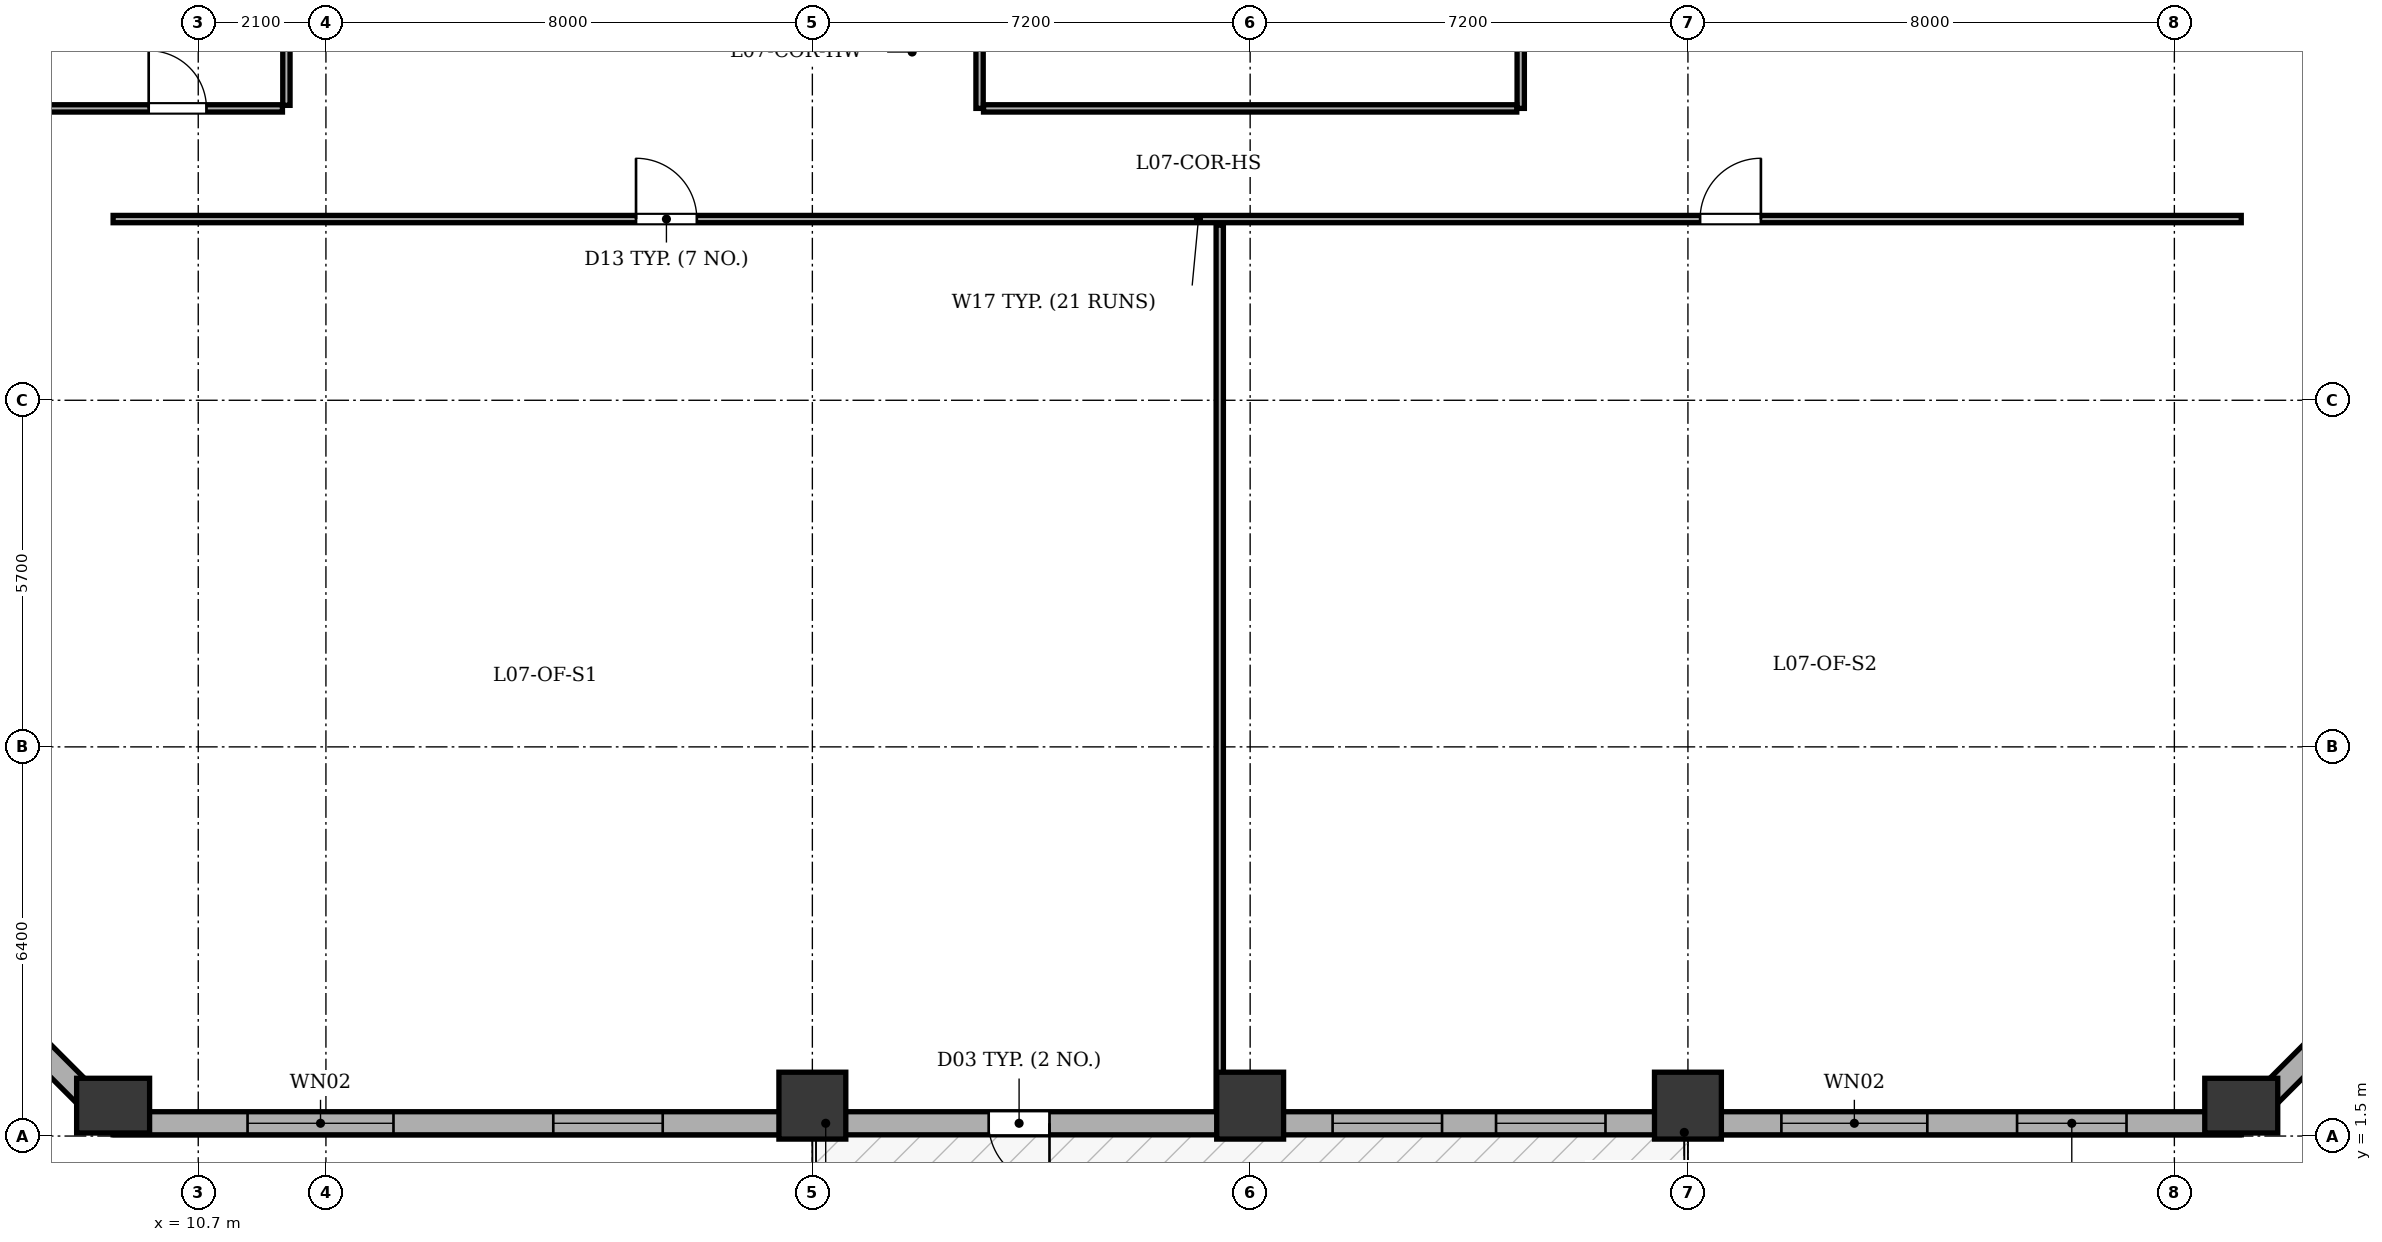
"""IFC4 building model, lengths in metres.
Left out: names, types, materials, properties, quantities, classifications, styles, units other than length and angle.
Written with IfcOpenShell. Run it as: python <this file> out.ifc"""

import sys

from ifc_helpers import new_model, si_unit, direction, frame, frame_2d, origin, origin_2d, place, context, subcontext, project, spatial, rectangle, extrude, element, fill, save


model = new_model("IFC4")
c1 = context("Model", 3, precision=1e-05, world=origin(), true_north=direction((0.0, 1.0)))
c2 = subcontext(c1, "Body", "Model", "MODEL_VIEW")
j1 = project(units=[si_unit("LENGTHUNIT", "METRE"), si_unit("PLANEANGLEUNIT", "RADIAN")], contexts=[c1])
p1 = place(None, origin())
s1 = spatial("IfcSite", under=j1, at=p1, CompositionType="ELEMENT")
p2 = place(p1, origin())
s2 = spatial("IfcBuilding", under=s1, at=p2, CompositionType="ELEMENT")
p3 = place(p2, frame((0.0, 0.0, 32.1)))
s3 = spatial("IfcBuildingStorey", under=s2, at=p3, CompositionType="ELEMENT", Elevation=32.1)
p4 = place(p3, frame((9.3, 2.0, 0.0), z_axis=(0.0, 0.0, 1.0), x_axis=(1.0, 0.0, 0.0)))
e1 = element("IfcColumn", 1, at=p4, inside=s3, PredefinedType="COLUMN", context=c2, shape_type="SweptSolid", body=[
    extrude(rectangle(XDim=0.9, YDim=1.2, at=origin_2d()), origin(), (0.0, 0.0, 1.0), 3.9),
])
for number, where, z_axis, x_axis in (
    (2, (20.8, 2.0, 0.0), (0.0, 0.0, 1.0), (1.0, 0.0, 0.0)),
    (3, (28.0, 2.0, 0.0), (0.0, 0.0, 1.0), (1.0, 0.0, 0.0)),
    (4, (35.2, 2.0, 0.0), (0.0, 0.0, 1.0), (1.0, 0.0, 0.0)),
):
    element("IfcColumn", number, at=place(p3, frame(where, z_axis=z_axis, x_axis=x_axis)), inside=s3, PredefinedType="COLUMN", context=c2, shape_type="SweptSolid", body=[
        extrude(rectangle(XDim=1.1, YDim=1.1, at=origin_2d()), origin(), (0.0, 0.0, 1.0), 3.9),
    ])
p5 = place(p3, frame((44.3, 2.0, 0.0), z_axis=(0.0, 0.0, 1.0), x_axis=(1.0, 0.0, 0.0)))
e5 = element("IfcColumn", 5, at=p5, inside=s3, PredefinedType="COLUMN", context=c2, shape_type="SweptSolid", body=[
    extrude(rectangle(XDim=0.9, YDim=1.2, at=origin_2d()), origin(), (0.0, 0.0, 1.0), 3.9),
])
p6 = place(p3, frame((44.3, 1.71, 0.0), z_axis=(0.0, 0.0, 1.0), x_axis=(-1.0, 0.0, 0.0)))
e6 = element("IfcWall", 6, at=p6, inside=s3, PredefinedType="STANDARD", context=c2, shape_type="SweptSolid", body=[
    extrude(rectangle(XDim=35.0, YDim=0.38, at=frame_2d((17.5, 0.0))), origin(), (0.0, 0.0, 1.0), 3.135),
])
p7 = place(p6, frame((19.6, 0.0, 0.0)))
e7 = element("IfcOpeningElement", 7, at=p7, cuts=e6, PredefinedType="OPENING", context=c2, shape_type="SweptSolid", body=[
    extrude(rectangle(XDim=1.0, YDim=2.02, at=frame_2d((0.5, 1.01))), frame((0.0, 0.2, 0.0), z_axis=(0.0, -1.0, 0.0), x_axis=(1.0, 0.0, 0.0)), (0.0, 0.0, 1.0), 0.4),
])
p8 = place(p6, frame((1.887, 0.0, 0.8)))
e8 = element("IfcOpeningElement", 8, at=p8, cuts=e6, PredefinedType="OPENING", context=c2, shape_type="SweptSolid", body=[
    extrude(rectangle(XDim=1.8, YDim=1.9, at=frame_2d((0.9, 0.95))), frame((0.0, 0.2, 0.0), z_axis=(0.0, -1.0, 0.0), x_axis=(1.0, 0.0, 0.0)), (0.0, 0.0, 1.0), 0.4),
])
p9 = place(p6, frame((5.163, 0.0, 0.8)))
e9 = element("IfcOpeningElement", 9, at=p9, cuts=e6, PredefinedType="OPENING", context=c2, shape_type="SweptSolid", body=[
    extrude(rectangle(XDim=2.4, YDim=1.9, at=frame_2d((1.2, 0.95))), frame((0.0, 0.2, 0.0), z_axis=(0.0, -1.0, 0.0), x_axis=(1.0, 0.0, 0.0)), (0.0, 0.0, 1.0), 0.4),
])
p10 = place(p6, frame((10.456, 0.0, 0.8)))
e10 = element("IfcOpeningElement", 10, at=p10, cuts=e6, PredefinedType="OPENING", context=c2, shape_type="SweptSolid", body=[
    extrude(rectangle(XDim=1.8, YDim=1.9, at=frame_2d((0.9, 0.95))), frame((0.0, 0.2, 0.0), z_axis=(0.0, -1.0, 0.0), x_axis=(1.0, 0.0, 0.0)), (0.0, 0.0, 1.0), 0.4),
])
p11 = place(p6, frame((13.144, 0.0, 0.8)))
e11 = element("IfcOpeningElement", 11, at=p11, cuts=e6, PredefinedType="OPENING", context=c2, shape_type="SweptSolid", body=[
    extrude(rectangle(XDim=1.8, YDim=1.9, at=frame_2d((0.9, 0.95))), frame((0.0, 0.2, 0.0), z_axis=(0.0, -1.0, 0.0), x_axis=(1.0, 0.0, 0.0)), (0.0, 0.0, 1.0), 0.4),
])
p12 = place(p6, frame((25.961, 0.0, 0.8)))
e12 = element("IfcOpeningElement", 12, at=p12, cuts=e6, PredefinedType="OPENING", context=c2, shape_type="SweptSolid", body=[
    extrude(rectangle(XDim=1.8, YDim=1.9, at=frame_2d((0.9, 0.95))), frame((0.0, 0.2, 0.0), z_axis=(0.0, -1.0, 0.0), x_axis=(1.0, 0.0, 0.0)), (0.0, 0.0, 1.0), 0.4),
])
p13 = place(p6, frame((30.389, 0.0, 0.8)))
e13 = element("IfcOpeningElement", 13, at=p13, cuts=e6, PredefinedType="OPENING", context=c2, shape_type="SweptSolid", body=[
    extrude(rectangle(XDim=2.4, YDim=1.9, at=frame_2d((1.2, 0.95))), frame((0.0, 0.2, 0.0), z_axis=(0.0, -1.0, 0.0), x_axis=(1.0, 0.0, 0.0)), (0.0, 0.0, 1.0), 0.4),
])
p14 = place(p3, frame((9.3, 1.71, 0.0), z_axis=(0.0, 0.0, 1.0), x_axis=(-0.707106781187, 0.707106781187, 0.0)))
e14 = element("IfcWall", 14, at=p14, inside=s3, PredefinedType="STANDARD", context=c2, shape_type="SweptSolid", body=[
    extrude(rectangle(XDim=6.774, YDim=0.38, at=frame_2d((3.387, 0.0))), origin(), (0.0, 0.0, 1.0), 3.135),
])
p15 = place(p14, frame((2.687, 0.0, 0.8)))
e15 = element("IfcOpeningElement", 15, at=p15, cuts=e14, PredefinedType="OPENING", context=c2, shape_type="SweptSolid", body=[
    extrude(rectangle(XDim=1.4, YDim=1.65, at=frame_2d((0.7, 0.825))), frame((0.0, 0.2, 0.0), z_axis=(0.0, -1.0, 0.0), x_axis=(1.0, 0.0, 0.0)), (0.0, 0.0, 1.0), 0.4),
])
p16 = place(p3, frame((49.09, 6.5, 0.0), z_axis=(0.0, 0.0, 1.0), x_axis=(-0.707106781187, -0.707106781187, 0.0)))
e16 = element("IfcWall", 16, at=p16, inside=s3, PredefinedType="STANDARD", context=c2, shape_type="SweptSolid", body=[
    extrude(rectangle(XDim=6.774, YDim=0.38, at=frame_2d((3.387, 0.0))), origin(), (0.0, 0.0, 1.0), 3.135),
])
p17 = place(p16, frame((2.687, 0.0, 0.8)))
e17 = element("IfcOpeningElement", 17, at=p17, cuts=e16, PredefinedType="OPENING", context=c2, shape_type="SweptSolid", body=[
    extrude(rectangle(XDim=1.4, YDim=1.65, at=frame_2d((0.7, 0.825))), frame((0.0, 0.2, 0.0), z_axis=(0.0, -1.0, 0.0), x_axis=(1.0, 0.0, 0.0)), (0.0, 0.0, 1.0), 0.4),
])
for number, where, z_axis, x_axis in (
    (18, (23.55, 18.4, 0.0), (0.0, 0.0, 1.0), (0.0, 1.0, 0.0)),
    (19, (32.45, 18.4, 0.0), (0.0, 0.0, 1.0), (0.0, 1.0, 0.0)),
):
    element("IfcWall", number, at=place(p3, frame(where, z_axis=z_axis, x_axis=x_axis)), inside=s3, PredefinedType="PARTITIONING", context=c2, shape_type="SweptSolid", body=[
        extrude(rectangle(XDim=3.485, YDim=0.12, at=frame_2d((1.743, 0.0))), origin(), (0.0, 0.0, 1.0), 3.6),
    ])
p18 = place(p3, frame((23.615, 18.4, 0.0), z_axis=(0.0, 0.0, 1.0), x_axis=(1.0, 0.0, 0.0)))
e20 = element("IfcWall", 20, at=p18, inside=s3, PredefinedType="PARTITIONING", context=c2, shape_type="SweptSolid", body=[
    extrude(rectangle(XDim=8.77, YDim=0.12, at=frame_2d((4.385, 0.0))), origin(), (0.0, 0.0, 1.0), 3.6),
])
p19 = place(p3, frame((9.3, 16.58, 0.0), z_axis=(0.0, 0.0, 1.0), x_axis=(1.0, 0.0, 0.0)))
e21 = element("IfcWall", 21, at=p19, inside=s3, PredefinedType="PARTITIONING", context=c2, shape_type="SweptSolid", body=[
    extrude(rectangle(XDim=35.0, YDim=0.12, at=frame_2d((17.5, 0.0))), origin(), (0.0, 0.0, 1.0), 3.6),
])
p20 = place(p19, frame((8.6, 0.0, 0.0)))
e22 = element("IfcOpeningElement", 22, at=p20, cuts=e21, PredefinedType="OPENING", context=c2, shape_type="SweptSolid", body=[
    extrude(rectangle(XDim=1.0, YDim=2.1, at=frame_2d((0.5, 1.05))), frame((0.0, 0.07, 0.0), z_axis=(0.0, -1.0, 0.0), x_axis=(1.0, 0.0, 0.0)), (0.0, 0.0, 1.0), 0.14),
])
p21 = place(p19, frame((26.1, 0.0, 0.0)))
e23 = element("IfcOpeningElement", 23, at=p21, cuts=e21, PredefinedType="OPENING", context=c2, shape_type="SweptSolid", body=[
    extrude(rectangle(XDim=1.0, YDim=2.1, at=frame_2d((0.5, 1.05))), frame((0.0, 0.07, 0.0), z_axis=(0.0, -1.0, 0.0), x_axis=(1.0, 0.0, 0.0)), (0.0, 0.0, 1.0), 0.14),
])
p22 = place(p3, frame((27.5, 1.905, 0.0), z_axis=(0.0, 0.0, 1.0), x_axis=(0.0, 1.0, 0.0)))
e24 = element("IfcWall", 24, at=p22, inside=s3, PredefinedType="PARTITIONING", context=c2, shape_type="SweptSolid", body=[
    extrude(rectangle(XDim=14.575, YDim=0.12, at=frame_2d((7.288, 0.0))), origin(), (0.0, 0.0, 1.0), 3.6),
])
p23 = place(p3, frame((12.15, 18.45, 0.0), z_axis=(0.0, 0.0, 1.0), x_axis=(0.0, 1.0, 0.0)))
e25 = element("IfcWall", 25, at=p23, inside=s3, PredefinedType="PARTITIONING", context=c2, shape_type="SweptSolid", body=[
    extrude(rectangle(XDim=17.5, YDim=0.12, at=frame_2d((8.75, 0.0))), origin(), (0.0, 0.0, 1.0), 3.6),
])
p24 = place(p3, frame((4.705, 18.4, 0.0), z_axis=(0.0, 0.0, 1.0), x_axis=(1.0, 0.0, 0.0)))
e26 = element("IfcWall", 26, at=p24, inside=s3, PredefinedType="PARTITIONING", context=c2, shape_type="SweptSolid", body=[
    extrude(rectangle(XDim=7.38, YDim=0.12, at=frame_2d((3.69, 0.0))), origin(), (0.0, 0.0, 1.0), 3.6),
])
p25 = place(p24, frame((5.18, 0.0, 0.0)))
e27 = element("IfcOpeningElement", 27, at=p25, cuts=e26, PredefinedType="OPENING", context=c2, shape_type="SweptSolid", body=[
    extrude(rectangle(XDim=0.95, YDim=2.1, at=frame_2d((0.475, 1.05))), frame((0.0, 0.07, 0.0), z_axis=(0.0, -1.0, 0.0), x_axis=(1.0, 0.0, 0.0)), (0.0, 0.0, 1.0), 0.14),
])
p26 = place(p7, origin())
e28 = element("IfcDoor", 28, at=p26, inside=s3, OperationType="SINGLE_SWING_LEFT", PredefinedType="DOOR", context=c2, shape_type="SweptSolid", body=[
    extrude(rectangle(XDim=1.0, YDim=2.02, at=frame_2d((0.5, 1.01))), frame((0.0, 0.025, 0.0), z_axis=(0.0, -1.0, 0.0), x_axis=(1.0, 0.0, 0.0)), (0.0, 0.0, 1.0), 0.05),
])
fill(e7, e28)
p27 = place(p8, origin())
e29 = element("IfcWindow", 29, at=p27, inside=s3, PartitioningType="SINGLE_PANEL", PredefinedType="WINDOW", context=c2, shape_type="SweptSolid", body=[
    extrude(rectangle(XDim=1.8, YDim=1.9, at=frame_2d((0.9, 0.95))), frame((0.0, -0.01, 0.0), z_axis=(0.0, -1.0, 0.0), x_axis=(1.0, 0.0, 0.0)), (0.0, 0.0, 1.0), 0.06),
])
fill(e8, e29)
p28 = place(p9, origin())
e30 = element("IfcWindow", 30, at=p28, inside=s3, PartitioningType="SINGLE_PANEL", PredefinedType="WINDOW", context=c2, shape_type="SweptSolid", body=[
    extrude(rectangle(XDim=2.4, YDim=1.9, at=frame_2d((1.2, 0.95))), frame((0.0, -0.01, 0.0), z_axis=(0.0, -1.0, 0.0), x_axis=(1.0, 0.0, 0.0)), (0.0, 0.0, 1.0), 0.06),
])
fill(e9, e30)
p29 = place(p10, origin())
e31 = element("IfcWindow", 31, at=p29, inside=s3, PartitioningType="SINGLE_PANEL", PredefinedType="WINDOW", context=c2, shape_type="SweptSolid", body=[
    extrude(rectangle(XDim=1.8, YDim=1.9, at=frame_2d((0.9, 0.95))), frame((0.0, -0.01, 0.0), z_axis=(0.0, -1.0, 0.0), x_axis=(1.0, 0.0, 0.0)), (0.0, 0.0, 1.0), 0.06),
])
fill(e10, e31)
p30 = place(p11, origin())
e32 = element("IfcWindow", 32, at=p30, inside=s3, PartitioningType="SINGLE_PANEL", PredefinedType="WINDOW", context=c2, shape_type="SweptSolid", body=[
    extrude(rectangle(XDim=1.8, YDim=1.9, at=frame_2d((0.9, 0.95))), frame((0.0, -0.01, 0.0), z_axis=(0.0, -1.0, 0.0), x_axis=(1.0, 0.0, 0.0)), (0.0, 0.0, 1.0), 0.06),
])
fill(e11, e32)
p31 = place(p12, origin())
e33 = element("IfcWindow", 33, at=p31, inside=s3, PartitioningType="SINGLE_PANEL", PredefinedType="WINDOW", context=c2, shape_type="SweptSolid", body=[
    extrude(rectangle(XDim=1.8, YDim=1.9, at=frame_2d((0.9, 0.95))), frame((0.0, -0.01, 0.0), z_axis=(0.0, -1.0, 0.0), x_axis=(1.0, 0.0, 0.0)), (0.0, 0.0, 1.0), 0.06),
])
fill(e12, e33)
p32 = place(p13, origin())
e34 = element("IfcWindow", 34, at=p32, inside=s3, PartitioningType="SINGLE_PANEL", PredefinedType="WINDOW", context=c2, shape_type="SweptSolid", body=[
    extrude(rectangle(XDim=2.4, YDim=1.9, at=frame_2d((1.2, 0.95))), frame((0.0, -0.01, 0.0), z_axis=(0.0, -1.0, 0.0), x_axis=(1.0, 0.0, 0.0)), (0.0, 0.0, 1.0), 0.06),
])
fill(e13, e34)
p33 = place(p20, origin())
e35 = element("IfcDoor", 35, at=p33, inside=s3, OperationType="SINGLE_SWING_LEFT", PredefinedType="DOOR", context=c2, shape_type="SweptSolid", body=[
    extrude(rectangle(XDim=1.0, YDim=2.1, at=frame_2d((0.5, 1.05))), frame((0.0, 0.025, 0.0), z_axis=(0.0, -1.0, 0.0), x_axis=(1.0, 0.0, 0.0)), (0.0, 0.0, 1.0), 0.05),
])
fill(e22, e35)
p34 = place(p21, origin())
e36 = element("IfcDoor", 36, at=p34, inside=s3, OperationType="SINGLE_SWING_RIGHT", PredefinedType="DOOR", context=c2, shape_type="SweptSolid", body=[
    extrude(rectangle(XDim=1.0, YDim=2.1, at=frame_2d((0.5, 1.05))), frame((0.0, 0.025, 0.0), z_axis=(0.0, -1.0, 0.0), x_axis=(1.0, 0.0, 0.0)), (0.0, 0.0, 1.0), 0.05),
])
fill(e23, e36)
p35 = place(p25, origin())
e37 = element("IfcDoor", 37, at=p35, inside=s3, OperationType="SINGLE_SWING_LEFT", PredefinedType="DOOR", context=c2, shape_type="SweptSolid", body=[
    extrude(rectangle(XDim=0.95, YDim=2.1, at=frame_2d((0.475, 1.05))), frame((0.0, 0.025, 0.0), z_axis=(0.0, -1.0, 0.0), x_axis=(1.0, 0.0, 0.0)), (0.0, 0.0, 1.0), 0.05),
])
fill(e27, e37)
save(model, sys.argv[1])
